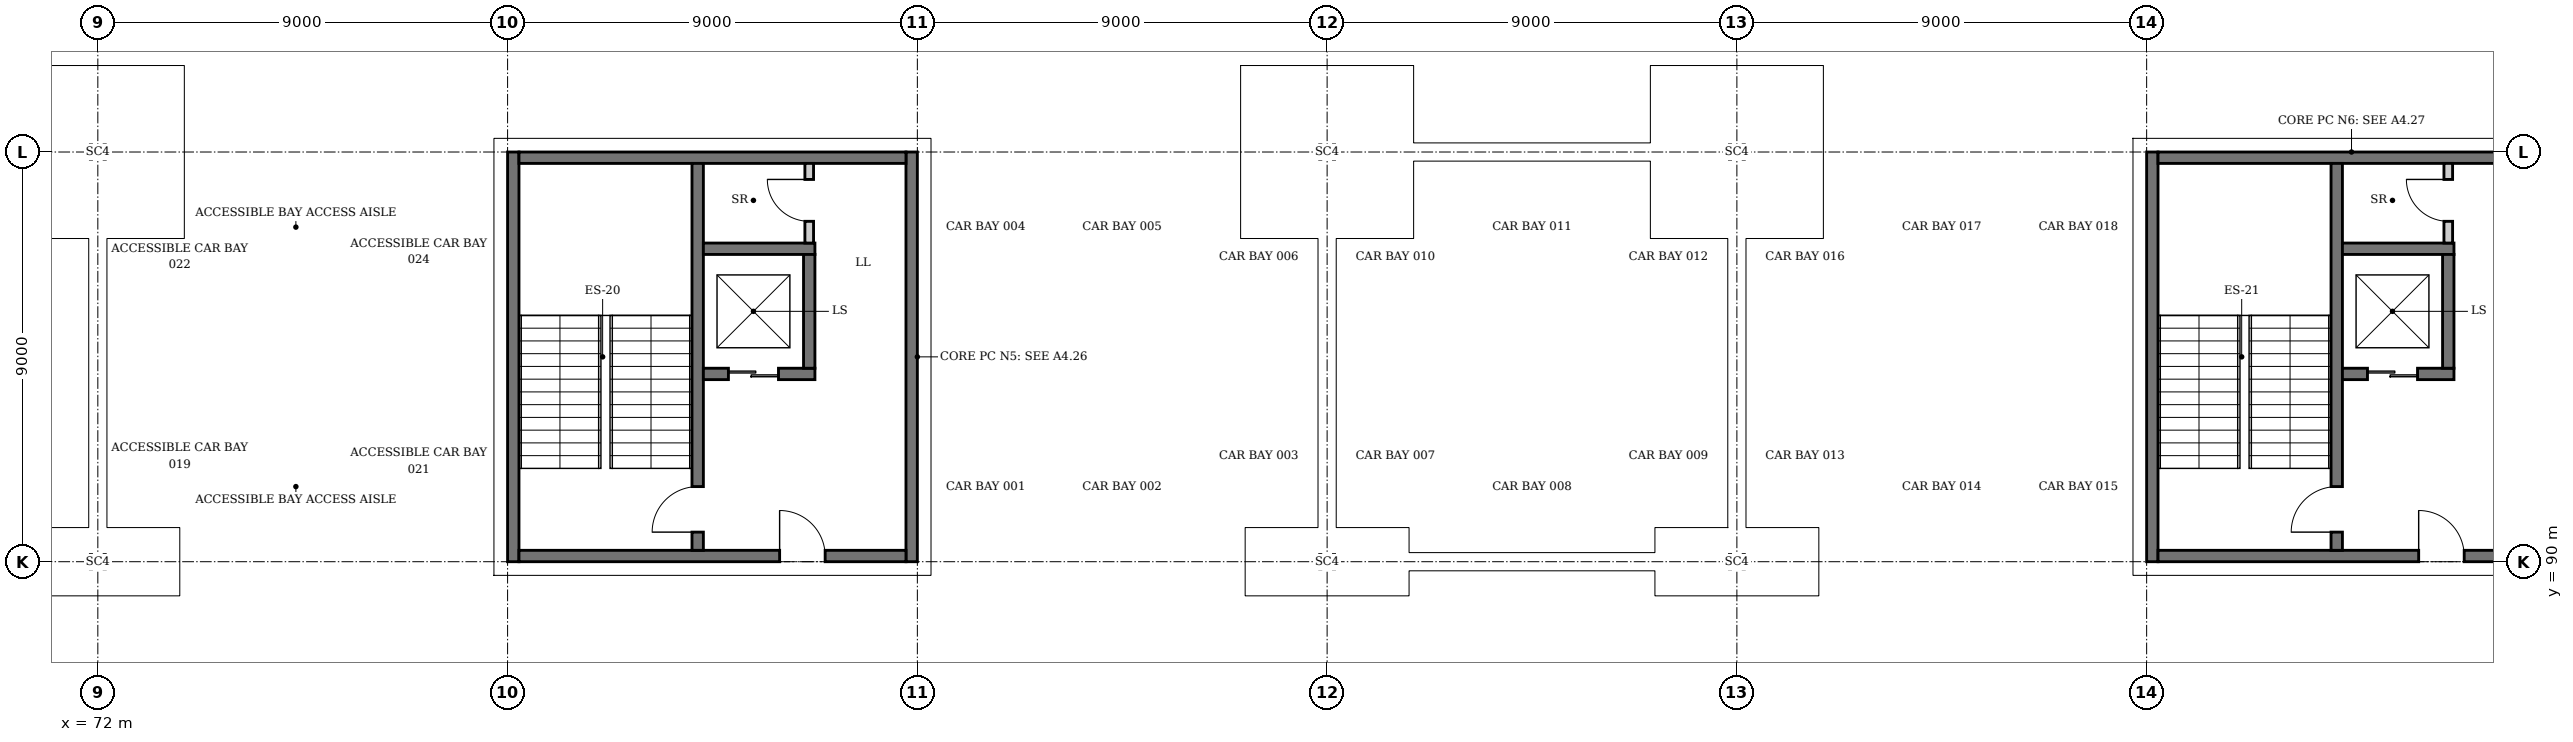
"""IFC4 building model, lengths in metres.
Left out: names, types, materials, properties, quantities, classifications, styles, units other than length and angle.
Written with IfcOpenShell. Run it as: python <this file> out.ifc"""

import sys

from ifc_helpers import new_model, si_unit, direction, frame, frame_2d, origin, origin_2d, place, context, subcontext, project, spatial, rectangle, i_section, extrude, element, fill, save


model = new_model("IFC4")
c1 = context("Model", 3, precision=1e-05, world=origin(), true_north=direction((0.0, 1.0)))
c2 = subcontext(c1, "Body", "Model", "MODEL_VIEW")
j1 = project(units=[si_unit("LENGTHUNIT", "METRE"), si_unit("PLANEANGLEUNIT", "RADIAN")], contexts=[c1])
p1 = place(None, origin())
s1 = spatial("IfcSite", under=j1, at=p1, CompositionType="ELEMENT")
p2 = place(p1, origin())
s2 = spatial("IfcBuilding", under=s1, at=p2, CompositionType="ELEMENT")
p3 = place(p2, frame((0.0, 0.0, -4.5)))
s3 = spatial("IfcBuildingStorey", under=s2, at=p3, CompositionType="ELEMENT", Elevation=-4.5)
for number, where, z_axis, x_axis in (
    (1, (72.0, 90.0, 0.0), (0.0, 0.0, 1.0), (0.0, 1.0, 0.0)),
    (2, (72.0, 99.0, 0.0), (0.0, 0.0, 1.0), (0.0, 1.0, 0.0)),
    (3, (99.0, 90.0, 0.0), (0.0, 0.0, 1.0), (0.0, 1.0, 0.0)),
    (4, (99.0, 99.0, 0.0), (0.0, 0.0, 1.0), (0.0, 1.0, 0.0)),
    (5, (108.0, 90.0, 0.0), (0.0, 0.0, 1.0), (0.0, 1.0, 0.0)),
    (6, (108.0, 99.0, 0.0), (0.0, 0.0, 1.0), (0.0, 1.0, 0.0)),
):
    element("IfcColumn", number, at=place(p3, frame(where, z_axis=z_axis, x_axis=x_axis)), inside=s3, PredefinedType="COLUMN", context=c2, shape_type="SweptSolid", body=[
        extrude(i_section(OverallWidth=0.311, OverallDepth=0.327, WebThickness=0.016, FlangeThickness=0.025, at=origin_2d()), origin(), (0.0, 0.0, 1.0), 4.5),
    ])
for number, where, z_axis, x_axis in (
    (7, (81.125, 90.0, 0.0), (0.0, 0.0, 1.0), (0.0, 1.0, 0.0)),
    (8, (89.875, 90.0, 0.0), (0.0, 0.0, 1.0), (0.0, 1.0, 0.0)),
):
    element("IfcWall", number, at=place(p3, frame(where, z_axis=z_axis, x_axis=x_axis)), inside=s3, PredefinedType="SHEAR", context=c2, shape_type="SweptSolid", body=[
        extrude(rectangle(XDim=9.0, YDim=0.25, at=frame_2d((4.5, 0.0))), origin(), (0.0, 0.0, 1.0), 4.5),
    ])
p4 = place(p3, frame((81.25, 90.125, 0.0), z_axis=(0.0, 0.0, 1.0), x_axis=(1.0, 0.0, 0.0)))
e9 = element("IfcWall", 9, at=p4, inside=s3, PredefinedType="SHEAR", context=c2, shape_type="SweptSolid", body=[
    extrude(rectangle(XDim=8.5, YDim=0.25, at=frame_2d((4.25, 0.0))), origin(), (0.0, 0.0, 1.0), 4.5),
])
p5 = place(p4, frame((5.725, 0.0, 0.0)))
e10 = element("IfcOpeningElement", 10, at=p5, cuts=e9, PredefinedType="OPENING", context=c2, shape_type="SweptSolid", body=[
    extrude(rectangle(XDim=1.0, YDim=2.1, at=frame_2d((0.5, 1.05))), frame((0.0, 0.135, 0.0), z_axis=(0.0, -1.0, 0.0), x_axis=(1.0, 0.0, 0.0)), (0.0, 0.0, 1.0), 0.27),
])
p6 = place(p3, frame((81.25, 98.875, 0.0), z_axis=(0.0, 0.0, 1.0), x_axis=(1.0, 0.0, 0.0)))
e11 = element("IfcWall", 11, at=p6, inside=s3, PredefinedType="SHEAR", context=c2, shape_type="SweptSolid", body=[
    extrude(rectangle(XDim=8.5, YDim=0.25, at=frame_2d((4.25, 0.0))), origin(), (0.0, 0.0, 1.0), 4.5),
])
p7 = place(p3, frame((117.125, 90.0, 0.0), z_axis=(0.0, 0.0, 1.0), x_axis=(0.0, 1.0, 0.0)))
e12 = element("IfcWall", 12, at=p7, inside=s3, PredefinedType="SHEAR", context=c2, shape_type="SweptSolid", body=[
    extrude(rectangle(XDim=9.0, YDim=0.25, at=frame_2d((4.5, 0.0))), origin(), (0.0, 0.0, 1.0), 4.5),
])
p8 = place(p3, frame((117.25, 90.125, 0.0), z_axis=(0.0, 0.0, 1.0), x_axis=(1.0, 0.0, 0.0)))
e13 = element("IfcWall", 13, at=p8, inside=s3, PredefinedType="SHEAR", context=c2, shape_type="SweptSolid", body=[
    extrude(rectangle(XDim=8.5, YDim=0.25, at=frame_2d((4.25, 0.0))), origin(), (0.0, 0.0, 1.0), 4.5),
])
p9 = place(p8, frame((5.725, 0.0, 0.0)))
e14 = element("IfcOpeningElement", 14, at=p9, cuts=e13, PredefinedType="OPENING", context=c2, shape_type="SweptSolid", body=[
    extrude(rectangle(XDim=1.0, YDim=2.1, at=frame_2d((0.5, 1.05))), frame((0.0, 0.135, 0.0), z_axis=(0.0, -1.0, 0.0), x_axis=(1.0, 0.0, 0.0)), (0.0, 0.0, 1.0), 0.27),
])
p10 = place(p3, frame((117.25, 98.875, 0.0), z_axis=(0.0, 0.0, 1.0), x_axis=(1.0, 0.0, 0.0)))
e15 = element("IfcWall", 15, at=p10, inside=s3, PredefinedType="SHEAR", context=c2, shape_type="SweptSolid", body=[
    extrude(rectangle(XDim=8.5, YDim=0.25, at=frame_2d((4.25, 0.0))), origin(), (0.0, 0.0, 1.0), 4.5),
])
p11 = place(p3, frame((85.175, 90.25, 0.0), z_axis=(0.0, 0.0, 1.0), x_axis=(0.0, 1.0, 0.0)))
e16 = element("IfcWall", 16, at=p11, inside=s3, PredefinedType="SOLIDWALL", context=c2, shape_type="SweptSolid", body=[
    extrude(rectangle(XDim=8.5, YDim=0.25, at=frame_2d((4.25, 0.0))), origin(), (0.0, 0.0, 1.0), 4.25),
])
p12 = place(p11, frame((0.4, 0.0, 0.0)))
e17 = element("IfcOpeningElement", 17, at=p12, cuts=e16, PredefinedType="OPENING", context=c2, shape_type="SweptSolid", body=[
    extrude(rectangle(XDim=1.0, YDim=2.1, at=frame_2d((0.5, 1.05))), frame((0.0, 0.135, 0.0), z_axis=(0.0, -1.0, 0.0), x_axis=(1.0, 0.0, 0.0)), (0.0, 0.0, 1.0), 0.27),
])
p13 = place(p3, frame((85.3, 94.125, 0.0), z_axis=(0.0, 0.0, 1.0), x_axis=(1.0, 0.0, 0.0)))
e18 = element("IfcWall", 18, at=p13, inside=s3, PredefinedType="SOLIDWALL", context=c2, shape_type="SweptSolid", body=[
    extrude(rectangle(XDim=2.45, YDim=0.25, at=frame_2d((1.225, 0.0))), origin(), (0.0, 0.0, 1.0), 4.5),
])
p14 = place(p13, frame((0.55, 0.0, 0.0)))
e19 = element("IfcOpeningElement", 19, at=p14, cuts=e18, PredefinedType="OPENING", context=c2, shape_type="SweptSolid", body=[
    extrude(rectangle(XDim=1.1, YDim=2.1, at=frame_2d((0.55, 1.05))), frame((0.0, 0.135, 0.0), z_axis=(0.0, -1.0, 0.0), x_axis=(1.0, 0.0, 0.0)), (0.0, 0.0, 1.0), 0.27),
])
p15 = place(p3, frame((85.3, 96.875, 0.0), z_axis=(0.0, 0.0, 1.0), x_axis=(1.0, 0.0, 0.0)))
e20 = element("IfcWall", 20, at=p15, inside=s3, PredefinedType="SOLIDWALL", context=c2, shape_type="SweptSolid", body=[
    extrude(rectangle(XDim=2.45, YDim=0.25, at=frame_2d((1.225, 0.0))), origin(), (0.0, 0.0, 1.0), 4.5),
])
p16 = place(p3, frame((87.625, 94.25, 0.0), z_axis=(0.0, 0.0, 1.0), x_axis=(0.0, 1.0, 0.0)))
e21 = element("IfcWall", 21, at=p16, inside=s3, PredefinedType="SOLIDWALL", context=c2, shape_type="SweptSolid", body=[
    extrude(rectangle(XDim=2.5, YDim=0.25, at=frame_2d((1.25, 0.0))), origin(), (0.0, 0.0, 1.0), 4.5),
])
p17 = place(p3, frame((121.175, 90.25, 0.0), z_axis=(0.0, 0.0, 1.0), x_axis=(0.0, 1.0, 0.0)))
e22 = element("IfcWall", 22, at=p17, inside=s3, PredefinedType="SOLIDWALL", context=c2, shape_type="SweptSolid", body=[
    extrude(rectangle(XDim=8.5, YDim=0.25, at=frame_2d((4.25, 0.0))), origin(), (0.0, 0.0, 1.0), 4.25),
])
p18 = place(p17, frame((0.4, 0.0, 0.0)))
e23 = element("IfcOpeningElement", 23, at=p18, cuts=e22, PredefinedType="OPENING", context=c2, shape_type="SweptSolid", body=[
    extrude(rectangle(XDim=1.0, YDim=2.1, at=frame_2d((0.5, 1.05))), frame((0.0, 0.135, 0.0), z_axis=(0.0, -1.0, 0.0), x_axis=(1.0, 0.0, 0.0)), (0.0, 0.0, 1.0), 0.27),
])
p19 = place(p3, frame((121.3, 94.125, 0.0), z_axis=(0.0, 0.0, 1.0), x_axis=(1.0, 0.0, 0.0)))
e24 = element("IfcWall", 24, at=p19, inside=s3, PredefinedType="SOLIDWALL", context=c2, shape_type="SweptSolid", body=[
    extrude(rectangle(XDim=2.45, YDim=0.25, at=frame_2d((1.225, 0.0))), origin(), (0.0, 0.0, 1.0), 4.5),
])
p20 = place(p19, frame((0.55, 0.0, 0.0)))
e25 = element("IfcOpeningElement", 25, at=p20, cuts=e24, PredefinedType="OPENING", context=c2, shape_type="SweptSolid", body=[
    extrude(rectangle(XDim=1.1, YDim=2.1, at=frame_2d((0.55, 1.05))), frame((0.0, 0.135, 0.0), z_axis=(0.0, -1.0, 0.0), x_axis=(1.0, 0.0, 0.0)), (0.0, 0.0, 1.0), 0.27),
])
p21 = place(p3, frame((121.3, 96.875, 0.0), z_axis=(0.0, 0.0, 1.0), x_axis=(1.0, 0.0, 0.0)))
e26 = element("IfcWall", 26, at=p21, inside=s3, PredefinedType="SOLIDWALL", context=c2, shape_type="SweptSolid", body=[
    extrude(rectangle(XDim=2.45, YDim=0.25, at=frame_2d((1.225, 0.0))), origin(), (0.0, 0.0, 1.0), 4.5),
])
p22 = place(p3, frame((123.625, 94.25, 0.0), z_axis=(0.0, 0.0, 1.0), x_axis=(0.0, 1.0, 0.0)))
e27 = element("IfcWall", 27, at=p22, inside=s3, PredefinedType="SOLIDWALL", context=c2, shape_type="SweptSolid", body=[
    extrude(rectangle(XDim=2.5, YDim=0.25, at=frame_2d((1.25, 0.0))), origin(), (0.0, 0.0, 1.0), 4.5),
])
p23 = place(p3, frame((87.625, 97.0, 0.0), z_axis=(0.0, 0.0, 1.0), x_axis=(0.0, 1.0, 0.0)))
e28 = element("IfcWall", 28, at=p23, inside=s3, PredefinedType="PARTITIONING", context=c2, shape_type="SweptSolid", body=[
    extrude(rectangle(XDim=1.75, YDim=0.19, at=frame_2d((0.875, 0.0))), origin(), (0.0, 0.0, 1.0), 4.25),
])
p24 = place(p23, frame((0.478, 0.0, 0.0)))
e29 = element("IfcOpeningElement", 29, at=p24, cuts=e28, PredefinedType="OPENING", context=c2, shape_type="SweptSolid", body=[
    extrude(rectangle(XDim=0.92, YDim=2.1, at=frame_2d((0.46, 1.05))), frame((0.0, 0.105, 0.0), z_axis=(0.0, -1.0, 0.0), x_axis=(1.0, 0.0, 0.0)), (0.0, 0.0, 1.0), 0.21),
])
p25 = place(p3, frame((123.625, 97.0, 0.0), z_axis=(0.0, 0.0, 1.0), x_axis=(0.0, 1.0, 0.0)))
e30 = element("IfcWall", 30, at=p25, inside=s3, PredefinedType="PARTITIONING", context=c2, shape_type="SweptSolid", body=[
    extrude(rectangle(XDim=1.75, YDim=0.19, at=frame_2d((0.875, 0.0))), origin(), (0.0, 0.0, 1.0), 4.25),
])
p26 = place(p25, frame((0.478, 0.0, 0.0)))
e31 = element("IfcOpeningElement", 31, at=p26, cuts=e30, PredefinedType="OPENING", context=c2, shape_type="SweptSolid", body=[
    extrude(rectangle(XDim=0.92, YDim=2.1, at=frame_2d((0.46, 1.05))), frame((0.0, 0.105, 0.0), z_axis=(0.0, -1.0, 0.0), x_axis=(1.0, 0.0, 0.0)), (0.0, 0.0, 1.0), 0.21),
])
p27 = place(p14, origin())
e32 = element("IfcDoor", 32, at=p27, inside=s3, OperationType="DOUBLE_DOOR_SLIDING", PredefinedType="DOOR", context=c2, shape_type="SweptSolid", body=[
    extrude(rectangle(XDim=1.1, YDim=2.1, at=frame_2d((0.55, 1.05))), frame((0.0, 0.025, 0.0), z_axis=(0.0, -1.0, 0.0), x_axis=(1.0, 0.0, 0.0)), (0.0, 0.0, 1.0), 0.05),
])
fill(e19, e32)
p28 = place(p20, origin())
e33 = element("IfcDoor", 33, at=p28, inside=s3, OperationType="DOUBLE_DOOR_SLIDING", PredefinedType="DOOR", context=c2, shape_type="SweptSolid", body=[
    extrude(rectangle(XDim=1.1, YDim=2.1, at=frame_2d((0.55, 1.05))), frame((0.0, 0.025, 0.0), z_axis=(0.0, -1.0, 0.0), x_axis=(1.0, 0.0, 0.0)), (0.0, 0.0, 1.0), 0.05),
])
fill(e25, e33)
p29 = place(p12, origin())
e34 = element("IfcDoor", 34, at=p29, inside=s3, OperationType="SINGLE_SWING_LEFT", PredefinedType="DOOR", context=c2, shape_type="SweptSolid", body=[
    extrude(rectangle(XDim=1.0, YDim=2.1, at=frame_2d((0.5, 1.05))), frame((0.0, 0.025, 0.0), z_axis=(0.0, -1.0, 0.0), x_axis=(1.0, 0.0, 0.0)), (0.0, 0.0, 1.0), 0.05),
])
fill(e17, e34)
p30 = place(p24, origin())
e35 = element("IfcDoor", 35, at=p30, inside=s3, OperationType="SINGLE_SWING_RIGHT", PredefinedType="DOOR", context=c2, shape_type="SweptSolid", body=[
    extrude(rectangle(XDim=0.92, YDim=2.1, at=frame_2d((0.46, 1.05))), frame((0.0, 0.025, 0.0), z_axis=(0.0, -1.0, 0.0), x_axis=(1.0, 0.0, 0.0)), (0.0, 0.0, 1.0), 0.05),
])
fill(e29, e35)
p31 = place(p18, origin())
e36 = element("IfcDoor", 36, at=p31, inside=s3, OperationType="SINGLE_SWING_LEFT", PredefinedType="DOOR", context=c2, shape_type="SweptSolid", body=[
    extrude(rectangle(XDim=1.0, YDim=2.1, at=frame_2d((0.5, 1.05))), frame((0.0, 0.025, 0.0), z_axis=(0.0, -1.0, 0.0), x_axis=(1.0, 0.0, 0.0)), (0.0, 0.0, 1.0), 0.05),
])
fill(e23, e36)
p32 = place(p26, origin())
e37 = element("IfcDoor", 37, at=p32, inside=s3, OperationType="SINGLE_SWING_RIGHT", PredefinedType="DOOR", context=c2, shape_type="SweptSolid", body=[
    extrude(rectangle(XDim=0.92, YDim=2.1, at=frame_2d((0.46, 1.05))), frame((0.0, 0.025, 0.0), z_axis=(0.0, -1.0, 0.0), x_axis=(1.0, 0.0, 0.0)), (0.0, 0.0, 1.0), 0.05),
])
fill(e31, e37)
p33 = place(p5, origin())
e38 = element("IfcDoor", 38, at=p33, inside=s3, OperationType="SINGLE_SWING_LEFT", PredefinedType="DOOR", context=c2, shape_type="SweptSolid", body=[
    extrude(rectangle(XDim=1.0, YDim=2.1, at=frame_2d((0.5, 1.05))), frame((0.0, 0.025, 0.0), z_axis=(0.0, -1.0, 0.0), x_axis=(1.0, 0.0, 0.0)), (0.0, 0.0, 1.0), 0.05),
])
fill(e10, e38)
p34 = place(p9, origin())
e39 = element("IfcDoor", 39, at=p34, inside=s3, OperationType="SINGLE_SWING_LEFT", PredefinedType="DOOR", context=c2, shape_type="SweptSolid", body=[
    extrude(rectangle(XDim=1.0, YDim=2.1, at=frame_2d((0.5, 1.05))), frame((0.0, 0.025, 0.0), z_axis=(0.0, -1.0, 0.0), x_axis=(1.0, 0.0, 0.0)), (0.0, 0.0, 1.0), 0.05),
])
fill(e14, e39)
save(model, sys.argv[1])
